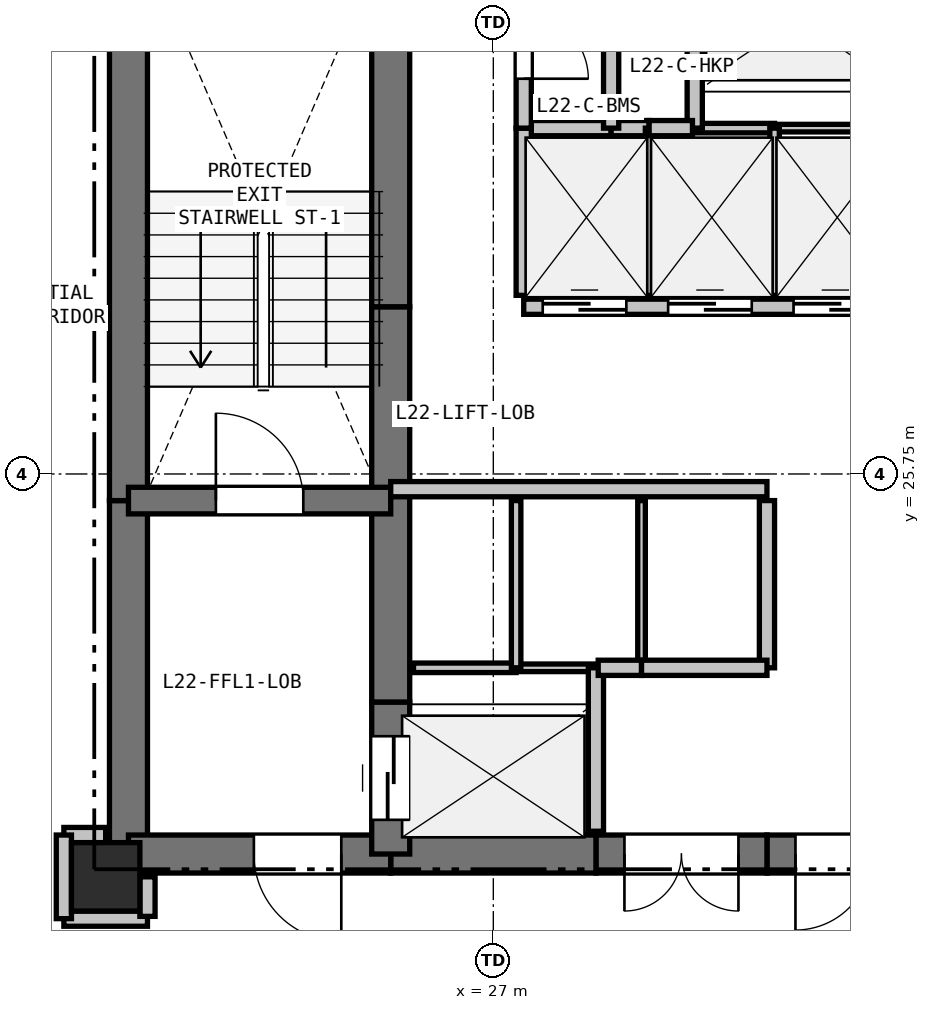
"""IFC4 building model, lengths in metres.
Left out: names, types, materials, properties, quantities, classifications, styles, units other than length and angle.
Written with IfcOpenShell. Run it as: python <this file> out.ifc"""

import sys

from ifc_helpers import new_model, si_unit, direction, frame, frame_2d, origin, origin_2d, place, context, subcontext, project, spatial, rectangle, extrude, element, fill, save


model = new_model("IFC4")
c1 = context("Model", 3, precision=1e-05, world=origin(), true_north=direction((0.0, 1.0)))
c2 = subcontext(c1, "Body", "Model", "MODEL_VIEW")
j1 = project(units=[si_unit("LENGTHUNIT", "METRE"), si_unit("PLANEANGLEUNIT", "RADIAN")], contexts=[c1])
p1 = place(None, origin())
s1 = spatial("IfcSite", under=j1, at=p1, CompositionType="ELEMENT")
p2 = place(p1, origin())
s2 = spatial("IfcBuilding", under=s1, at=p2, CompositionType="ELEMENT")
p3 = place(p2, frame((0.0, 0.0, 83.4)))
s3 = spatial("IfcBuildingStorey", under=s2, at=p3, CompositionType="ELEMENT", Elevation=83.4)
p4 = place(p3, frame((21.9, 20.45, 0.0), z_axis=(0.0, 0.0, 1.0), x_axis=(1.0, 0.0, 0.0)))
e1 = element("IfcColumn", 1, at=p4, inside=s3, PredefinedType="COLUMN", context=c2, shape_type="SweptSolid", body=[
    extrude(rectangle(XDim=0.9, YDim=0.9, at=origin_2d()), origin(), (0.0, 0.0, 1.0), 3.3),
])
p5 = place(p3, frame((22.2, 20.75, 0.0), z_axis=(0.0, 0.0, 1.0), x_axis=(0.0, 1.0, 0.0)))
e2 = element("IfcWall", 2, at=p5, inside=s3, PredefinedType="SHEAR", context=c2, shape_type="SweptSolid", body=[
    extrude(rectangle(XDim=4.65, YDim=0.5, at=frame_2d((2.325, 0.0))), origin(), (0.0, 0.0, 1.0), 3.05),
])
p6 = place(p3, frame((22.2, 25.4, 0.0), z_axis=(0.0, 0.0, 1.0), x_axis=(0.0, 1.0, 0.0)))
e3 = element("IfcWall", 3, at=p6, inside=s3, PredefinedType="SHEAR", context=c2, shape_type="SweptSolid", body=[
    extrude(rectangle(XDim=7.35, YDim=0.5, at=frame_2d((3.675, 0.0))), origin(), (0.0, 0.0, 1.0), 3.05),
])
p7 = place(p3, frame((32.35, 20.75, 0.0), z_axis=(0.0, 0.0, 1.0), x_axis=(-1.0, 0.0, 0.0)))
e4 = element("IfcWall", 4, at=p7, inside=s3, PredefinedType="SHEAR", context=c2, shape_type="SweptSolid", body=[
    extrude(rectangle(XDim=1.75, YDim=0.5, at=frame_2d((0.875, 0.0))), origin(), (0.0, 0.0, 1.0), 3.05),
])
p8 = place(p7, frame((0.375, 0.0, 0.0)))
e5 = element("IfcOpeningElement", 5, at=p8, cuts=e4, PredefinedType="OPENING", context=c2, shape_type="SweptSolid", body=[
    extrude(rectangle(XDim=1.0, YDim=2.15, at=frame_2d((0.5, 1.075))), frame((0.0, 0.26, 0.0), z_axis=(0.0, -1.0, 0.0), x_axis=(1.0, 0.0, 0.0)), (0.0, 0.0, 1.0), 0.52),
])
p9 = place(p3, frame((30.6, 20.75, 0.0), z_axis=(0.0, 0.0, 1.0), x_axis=(-1.0, 0.0, 0.0)))
e6 = element("IfcWall", 6, at=p9, inside=s3, PredefinedType="SHEAR", context=c2, shape_type="SweptSolid", body=[
    extrude(rectangle(XDim=2.25, YDim=0.5, at=frame_2d((1.125, 0.0))), origin(), (0.0, 0.0, 1.0), 3.05),
])
p10 = place(p9, frame((0.375, 0.0, 0.0)))
e7 = element("IfcOpeningElement", 7, at=p10, cuts=e6, PredefinedType="OPENING", context=c2, shape_type="SweptSolid", body=[
    extrude(rectangle(XDim=1.5, YDim=2.2, at=frame_2d((0.75, 1.1))), frame((0.0, 0.26, 0.0), z_axis=(0.0, -1.0, 0.0), x_axis=(1.0, 0.0, 0.0)), (0.0, 0.0, 1.0), 0.52),
])
p11 = place(p3, frame((28.35, 20.75, 0.0), z_axis=(0.0, 0.0, 1.0), x_axis=(-1.0, 0.0, 0.0)))
e8 = element("IfcWall", 8, at=p11, inside=s3, PredefinedType="SHEAR", context=c2, shape_type="SweptSolid", body=[
    extrude(rectangle(XDim=2.7, YDim=0.5, at=frame_2d((1.35, 0.0))), origin(), (0.0, 0.0, 1.0), 3.05),
])
p12 = place(p3, frame((25.65, 20.75, 0.0), z_axis=(0.0, 0.0, 1.0), x_axis=(-1.0, 0.0, 0.0)))
e9 = element("IfcWall", 9, at=p12, inside=s3, PredefinedType="SHEAR", context=c2, shape_type="SweptSolid", body=[
    extrude(rectangle(XDim=3.45, YDim=0.5, at=frame_2d((1.725, 0.0))), origin(), (0.0, 0.0, 1.0), 3.05),
])
p13 = place(p12, frame((0.65, 0.0, 0.0)))
e10 = element("IfcOpeningElement", 10, at=p13, cuts=e9, PredefinedType="OPENING", context=c2, shape_type="SweptSolid", body=[
    extrude(rectangle(XDim=1.15, YDim=2.15, at=frame_2d((0.575, 1.075))), frame((0.0, 0.26, 0.0), z_axis=(0.0, -1.0, 0.0), x_axis=(1.0, 0.0, 0.0)), (0.0, 0.0, 1.0), 0.52),
])
p14 = place(p3, frame((25.65, 20.75, 0.0), z_axis=(0.0, 0.0, 1.0), x_axis=(0.0, 1.0, 0.0)))
e11 = element("IfcWall", 11, at=p14, inside=s3, PredefinedType="SHEAR", context=c2, shape_type="SweptSolid", body=[
    extrude(rectangle(XDim=2.0, YDim=0.5, at=frame_2d((1.0, 0.0))), origin(), (0.0, 0.0, 1.0), 3.05),
])
p15 = place(p14, frame((0.45, 0.0, 0.0)))
e12 = element("IfcOpeningElement", 12, at=p15, cuts=e11, PredefinedType="OPENING", context=c2, shape_type="SweptSolid", body=[
    extrude(rectangle(XDim=1.1, YDim=2.15, at=frame_2d((0.55, 1.075))), frame((0.0, 0.26, 0.0), z_axis=(0.0, -1.0, 0.0), x_axis=(1.0, 0.0, 0.0)), (0.0, 0.0, 1.0), 0.52),
])
p16 = place(p3, frame((25.65, 22.75, 0.0), z_axis=(0.0, 0.0, 1.0), x_axis=(0.0, 1.0, 0.0)))
e13 = element("IfcWall", 13, at=p16, inside=s3, PredefinedType="SHEAR", context=c2, shape_type="SweptSolid", body=[
    extrude(rectangle(XDim=2.8, YDim=0.5, at=frame_2d((1.4, 0.0))), origin(), (0.0, 0.0, 1.0), 3.05),
])
p17 = place(p3, frame((25.65, 25.55, 0.0), z_axis=(0.0, 0.0, 1.0), x_axis=(0.0, 1.0, 0.0)))
e14 = element("IfcWall", 14, at=p17, inside=s3, PredefinedType="SHEAR", context=c2, shape_type="SweptSolid", body=[
    extrude(rectangle(XDim=2.4, YDim=0.5, at=frame_2d((1.2, 0.0))), origin(), (0.0, 0.0, 1.0), 3.05),
])
p18 = place(p3, frame((25.65, 27.95, 0.0), z_axis=(0.0, 0.0, 1.0), x_axis=(0.0, 1.0, 0.0)))
e15 = element("IfcWall", 15, at=p18, inside=s3, PredefinedType="SHEAR", context=c2, shape_type="SweptSolid", body=[
    extrude(rectangle(XDim=4.8, YDim=0.5, at=frame_2d((2.4, 0.0))), origin(), (0.0, 0.0, 1.0), 3.05),
])
p19 = place(p3, frame((22.2, 25.4, 0.0), z_axis=(0.0, 0.0, 1.0), x_axis=(1.0, 0.0, 0.0)))
e16 = element("IfcWall", 16, at=p19, inside=s3, PredefinedType="SHEAR", context=c2, shape_type="SweptSolid", body=[
    extrude(rectangle(XDim=3.45, YDim=0.35, at=frame_2d((1.725, 0.0))), origin(), (0.0, 0.0, 1.0), 3.05),
])
p20 = place(p19, frame((1.15, 0.0, 0.0)))
e17 = element("IfcOpeningElement", 17, at=p20, cuts=e16, PredefinedType="OPENING", context=c2, shape_type="SweptSolid", body=[
    extrude(rectangle(XDim=1.15, YDim=2.15, at=frame_2d((0.575, 1.075))), frame((0.0, 0.185, 0.0), z_axis=(0.0, -1.0, 0.0), x_axis=(1.0, 0.0, 0.0)), (0.0, 0.0, 1.0), 0.37),
])
p21 = place(p3, frame((25.65, 25.55, 0.0), z_axis=(0.0, 0.0, 1.0), x_axis=(1.0, 0.0, 0.0)))
e18 = element("IfcWall", 18, at=p21, inside=s3, PredefinedType="PARTITIONING", context=c2, shape_type="SweptSolid", body=[
    extrude(rectangle(XDim=4.95, YDim=0.2, at=frame_2d((2.475, 0.0))), origin(), (0.0, 0.0, 1.0), 3.05),
])
p22 = place(p3, frame((27.4, 27.95, 0.0), z_axis=(0.0, 0.0, 1.0), x_axis=(1.0, 0.0, 0.0)))
e19 = element("IfcWall", 19, at=p22, inside=s3, PredefinedType="PARTITIONING", context=c2, shape_type="SweptSolid", body=[
    extrude(rectangle(XDim=4.95, YDim=0.2, at=frame_2d((2.475, 0.0))), origin(), (0.0, 0.0, 1.0), 3.05),
])
p23 = place(p22, frame((0.25, 0.0, 0.0)))
e20 = element("IfcOpeningElement", 20, at=p23, cuts=e19, PredefinedType="OPENING", context=c2, shape_type="SweptSolid", body=[
    extrude(rectangle(XDim=1.1, YDim=2.15, at=frame_2d((0.55, 1.075))), frame((0.0, 0.11, 0.0), z_axis=(0.0, -1.0, 0.0), x_axis=(1.0, 0.0, 0.0)), (0.0, 0.0, 1.0), 0.22),
])
p24 = place(p22, frame((1.9, 0.0, 0.0)))
e21 = element("IfcOpeningElement", 21, at=p24, cuts=e19, PredefinedType="OPENING", context=c2, shape_type="SweptSolid", body=[
    extrude(rectangle(XDim=1.1, YDim=2.15, at=frame_2d((0.55, 1.075))), frame((0.0, 0.11, 0.0), z_axis=(0.0, -1.0, 0.0), x_axis=(1.0, 0.0, 0.0)), (0.0, 0.0, 1.0), 0.22),
])
p25 = place(p22, frame((3.55, 0.0, 0.0)))
e22 = element("IfcOpeningElement", 22, at=p25, cuts=e19, PredefinedType="OPENING", context=c2, shape_type="SweptSolid", body=[
    extrude(rectangle(XDim=1.1, YDim=2.15, at=frame_2d((0.55, 1.075))), frame((0.0, 0.11, 0.0), z_axis=(0.0, -1.0, 0.0), x_axis=(1.0, 0.0, 0.0)), (0.0, 0.0, 1.0), 0.22),
])
p26 = place(p3, frame((25.95, 23.2, 0.0), z_axis=(0.0, 0.0, 1.0), x_axis=(1.0, 0.0, 0.0)))
e23 = element("IfcWall", 23, at=p26, inside=s3, PredefinedType="PARTITIONING", context=c2, shape_type="SweptSolid", body=[
    extrude(rectangle(XDim=1.35, YDim=0.125, at=frame_2d((0.675, 0.0))), origin(), (0.0, 0.0, 1.0), 3.05),
])
p27 = place(p3, frame((27.3, 23.2, 0.0), z_axis=(0.0, 0.0, 1.0), x_axis=(1.0, 0.0, 0.0)))
e24 = element("IfcWall", 24, at=p27, inside=s3, PredefinedType="PARTITIONING", context=c2, shape_type="SweptSolid", body=[
    extrude(rectangle(XDim=1.05, YDim=0.1, at=frame_2d((0.525, 0.0))), origin(), (0.0, 0.0, 1.0), 3.05),
])
p28 = place(p3, frame((28.35, 23.2, 0.0), z_axis=(0.0, 0.0, 1.0), x_axis=(0.0, -1.0, 0.0)))
e25 = element("IfcWall", 25, at=p28, inside=s3, PredefinedType="PARTITIONING", context=c2, shape_type="SweptSolid", body=[
    extrude(rectangle(XDim=2.15, YDim=0.2, at=frame_2d((1.075, 0.0))), origin(), (0.0, 0.0, 1.0), 3.05),
])
p29 = place(p3, frame((32.05, 30.3, 0.0), z_axis=(0.0, 0.0, 1.0), x_axis=(-1.0, 0.0, 0.0)))
e26 = element("IfcWall", 26, at=p29, inside=s3, PredefinedType="PARTITIONING", context=c2, shape_type="SweptSolid", body=[
    extrude(rectangle(XDim=1.35, YDim=0.1, at=frame_2d((0.675, 0.0))), origin(), (0.0, 0.0, 1.0), 3.05),
])
p30 = place(p3, frame((30.7, 30.3, 0.0), z_axis=(0.0, 0.0, 1.0), x_axis=(-1.0, 0.0, 0.0)))
e27 = element("IfcWall", 27, at=p30, inside=s3, PredefinedType="PARTITIONING", context=c2, shape_type="SweptSolid", body=[
    extrude(rectangle(XDim=1.05, YDim=0.125, at=frame_2d((0.525, 0.0))), origin(), (0.0, 0.0, 1.0), 3.05),
])
p31 = place(p3, frame((29.65, 30.3, 0.0), z_axis=(0.0, 0.0, 1.0), x_axis=(0.0, 1.0, 0.0)))
e28 = element("IfcWall", 28, at=p31, inside=s3, PredefinedType="PARTITIONING", context=c2, shape_type="SweptSolid", body=[
    extrude(rectangle(XDim=2.15, YDim=0.2, at=frame_2d((1.075, 0.0))), origin(), (0.0, 0.0, 1.0), 3.05),
])
p32 = place(p3, frame((27.3, 25.4, 0.0), z_axis=(0.0, 0.0, 1.0), x_axis=(0.0, -1.0, 0.0)))
e29 = element("IfcWall", 29, at=p32, inside=s3, PredefinedType="PARTITIONING", context=c2, shape_type="SweptSolid", body=[
    extrude(rectangle(XDim=2.2, YDim=0.125, at=frame_2d((1.1, 0.0))), origin(), (0.0, 0.0, 1.0), 3.05),
])
p33 = place(p3, frame((28.95, 25.4, 0.0), z_axis=(0.0, 0.0, 1.0), x_axis=(0.0, -1.0, 0.0)))
e30 = element("IfcWall", 30, at=p33, inside=s3, PredefinedType="PARTITIONING", context=c2, shape_type="SweptSolid", body=[
    extrude(rectangle(XDim=2.2, YDim=0.1, at=frame_2d((1.1, 0.0))), origin(), (0.0, 0.0, 1.0), 3.05),
])
p34 = place(p3, frame((28.95, 23.2, 0.0), z_axis=(0.0, 0.0, 1.0), x_axis=(-1.0, 0.0, 0.0)))
e31 = element("IfcWall", 31, at=p34, inside=s3, PredefinedType="PARTITIONING", context=c2, shape_type="SweptSolid", body=[
    extrude(rectangle(XDim=0.57, YDim=0.2, at=frame_2d((0.285, 0.0))), origin(), (0.0, 0.0, 1.0), 3.05),
])
p35 = place(p3, frame((30.6, 25.4, 0.0), z_axis=(0.0, 0.0, 1.0), x_axis=(0.0, -1.0, 0.0)))
e32 = element("IfcWall", 32, at=p35, inside=s3, PredefinedType="PARTITIONING", context=c2, shape_type="SweptSolid", body=[
    extrude(rectangle(XDim=2.2, YDim=0.2, at=frame_2d((1.1, 0.0))), origin(), (0.0, 0.0, 1.0), 3.05),
])
p36 = place(p3, frame((30.6, 23.2, 0.0), z_axis=(0.0, 0.0, 1.0), x_axis=(-1.0, 0.0, 0.0)))
e33 = element("IfcWall", 33, at=p36, inside=s3, PredefinedType="PARTITIONING", context=c2, shape_type="SweptSolid", body=[
    extrude(rectangle(XDim=1.65, YDim=0.2, at=frame_2d((0.825, 0.0))), origin(), (0.0, 0.0, 1.0), 3.05),
])
p37 = place(p3, frame((27.4, 30.3, 0.0), z_axis=(0.0, 0.0, 1.0), x_axis=(1.0, 0.0, 0.0)))
e34 = element("IfcWall", 34, at=p37, inside=s3, PredefinedType="PARTITIONING", context=c2, shape_type="SweptSolid", body=[
    extrude(rectangle(XDim=1.15, YDim=0.2, at=frame_2d((0.575, 0.0))), origin(), (0.0, 0.0, 1.0), 3.05),
])
p38 = place(p3, frame((28.55, 30.3, 0.0), z_axis=(0.0, 0.0, 1.0), x_axis=(1.0, 0.0, 0.0)))
e35 = element("IfcWall", 35, at=p38, inside=s3, PredefinedType="PARTITIONING", context=c2, shape_type="SweptSolid", body=[
    extrude(rectangle(XDim=0.5, YDim=0.2, at=frame_2d((0.25, 0.0))), origin(), (0.0, 0.0, 1.0), 3.05),
])
p39 = place(p3, frame((29.05, 30.3, 0.0), z_axis=(0.0, 0.0, 1.0), x_axis=(0.0, -1.0, 0.0)))
e36 = element("IfcWall", 36, at=p39, inside=s3, PredefinedType="PARTITIONING", context=c2, shape_type="SweptSolid", body=[
    extrude(rectangle(XDim=2.2, YDim=0.1, at=frame_2d((1.1, 0.0))), origin(), (0.0, 0.0, 1.0), 3.05),
])
p40 = place(p3, frame((27.4, 28.1, 0.0), z_axis=(0.0, 0.0, 1.0), x_axis=(0.0, 1.0, 0.0)))
e37 = element("IfcWall", 37, at=p40, inside=s3, PredefinedType="PARTITIONING", context=c2, shape_type="SweptSolid", body=[
    extrude(rectangle(XDim=2.2, YDim=0.2, at=frame_2d((1.1, 0.0))), origin(), (0.0, 0.0, 1.0), 3.05),
])
p41 = place(p3, frame((29.05, 30.3, 0.0), z_axis=(0.0, 0.0, 1.0), x_axis=(1.0, 0.0, 0.0)))
e38 = element("IfcWall", 38, at=p41, inside=s3, PredefinedType="PARTITIONING", context=c2, shape_type="SweptSolid", body=[
    extrude(rectangle(XDim=0.57, YDim=0.2, at=frame_2d((0.285, 0.0))), origin(), (0.0, 0.0, 1.0), 3.05),
])
p42 = place(p3, frame((30.7, 30.3, 0.0), z_axis=(0.0, 0.0, 1.0), x_axis=(0.0, -1.0, 0.0)))
e39 = element("IfcWall", 39, at=p42, inside=s3, PredefinedType="PARTITIONING", context=c2, shape_type="SweptSolid", body=[
    extrude(rectangle(XDim=2.2, YDim=0.125, at=frame_2d((1.1, 0.0))), origin(), (0.0, 0.0, 1.0), 3.05),
])
p43 = place(p3, frame((27.4, 32.45, 0.0), z_axis=(0.0, 0.0, 1.0), x_axis=(0.0, -1.0, 0.0)))
e40 = element("IfcWall", 40, at=p43, inside=s3, PredefinedType="PARTITIONING", context=c2, shape_type="SweptSolid", body=[
    extrude(rectangle(XDim=2.15, YDim=0.2, at=frame_2d((1.075, 0.0))), origin(), (0.0, 0.0, 1.0), 3.05),
])
p44 = place(p43, frame((0.65, 0.0, 0.0)))
e41 = element("IfcOpeningElement", 41, at=p44, cuts=e40, PredefinedType="OPENING", context=c2, shape_type="SweptSolid", body=[
    extrude(rectangle(XDim=0.85, YDim=2.1, at=frame_2d((0.425, 1.05))), frame((0.0, 0.11, 0.0), z_axis=(0.0, -1.0, 0.0), x_axis=(1.0, 0.0, 0.0)), (0.0, 0.0, 1.0), 0.22),
])
p45 = place(p3, frame((21.35, 19.9, 0.0), z_axis=(0.0, 0.0, 1.0), x_axis=(1.0, 0.0, 0.0)))
e42 = element("IfcWall", 42, at=p45, inside=s3, PredefinedType="PARTITIONING", context=c2, shape_type="SweptSolid", body=[
    extrude(rectangle(XDim=1.1, YDim=0.2, at=frame_2d((0.55, 0.0))), origin(), (0.0, 0.0, 1.0), 2.423),
])
p46 = place(p3, frame((22.45, 19.93, 0.0), z_axis=(0.0, 0.0, 1.0), x_axis=(0.0, 1.0, 0.0)))
e43 = element("IfcWall", 43, at=p46, inside=s3, PredefinedType="PARTITIONING", context=c2, shape_type="SweptSolid", body=[
    extrude(rectangle(XDim=0.52, YDim=0.2, at=frame_2d((0.26, 0.0))), origin(), (0.0, 0.0, 1.0), 2.423),
])
p47 = place(p3, frame((21.9, 21.0, 0.0), z_axis=(0.0, 0.0, 1.0), x_axis=(-1.0, 0.0, 0.0)))
e44 = element("IfcWall", 44, at=p47, inside=s3, PredefinedType="PARTITIONING", context=c2, shape_type="SweptSolid", body=[
    extrude(rectangle(XDim=0.55, YDim=0.2, at=frame_2d((0.275, 0.0))), origin(), (0.0, 0.0, 1.0), 2.498),
])
p48 = place(p3, frame((21.35, 21.0, 0.0), z_axis=(0.0, 0.0, 1.0), x_axis=(0.0, -1.0, 0.0)))
e45 = element("IfcWall", 45, at=p48, inside=s3, PredefinedType="PARTITIONING", context=c2, shape_type="SweptSolid", body=[
    extrude(rectangle(XDim=1.1, YDim=0.2, at=frame_2d((0.55, 0.0))), origin(), (0.0, 0.0, 1.0), 2.423),
])
p49 = place(p3, frame((28.55, 32.45, 0.0), z_axis=(0.0, 0.0, 1.0), x_axis=(0.0, -1.0, 0.0)))
e46 = element("IfcWall", 46, at=p49, inside=s3, PredefinedType="PARTITIONING", context=c2, shape_type="SweptSolid", body=[
    extrude(rectangle(XDim=2.15, YDim=0.2, at=frame_2d((1.075, 0.0))), origin(), (0.0, 0.0, 1.0), 3.05),
])
p50 = place(p23, origin())
e47 = element("IfcDoor", 47, at=p50, inside=s3, OperationType="SLIDING_TO_LEFT", PredefinedType="DOOR", context=c2, shape_type="SweptSolid", body=[
    extrude(rectangle(XDim=1.1, YDim=2.15, at=frame_2d((0.55, 1.075))), frame((0.0, 0.025, 0.0), z_axis=(0.0, -1.0, 0.0), x_axis=(1.0, 0.0, 0.0)), (0.0, 0.0, 1.0), 0.05),
])
fill(e20, e47)
p51 = place(p24, origin())
e48 = element("IfcDoor", 48, at=p51, inside=s3, OperationType="SLIDING_TO_LEFT", PredefinedType="DOOR", context=c2, shape_type="SweptSolid", body=[
    extrude(rectangle(XDim=1.1, YDim=2.15, at=frame_2d((0.55, 1.075))), frame((0.0, 0.025, 0.0), z_axis=(0.0, -1.0, 0.0), x_axis=(1.0, 0.0, 0.0)), (0.0, 0.0, 1.0), 0.05),
])
fill(e21, e48)
p52 = place(p25, origin())
e49 = element("IfcDoor", 49, at=p52, inside=s3, OperationType="SLIDING_TO_LEFT", PredefinedType="DOOR", context=c2, shape_type="SweptSolid", body=[
    extrude(rectangle(XDim=1.1, YDim=2.15, at=frame_2d((0.55, 1.075))), frame((0.0, 0.025, 0.0), z_axis=(0.0, -1.0, 0.0), x_axis=(1.0, 0.0, 0.0)), (0.0, 0.0, 1.0), 0.05),
])
fill(e22, e49)
p53 = place(p8, origin())
e50 = element("IfcDoor", 50, at=p53, inside=s3, OperationType="SINGLE_SWING_RIGHT", PredefinedType="DOOR", context=c2, shape_type="SweptSolid", body=[
    extrude(rectangle(XDim=1.0, YDim=2.15, at=frame_2d((0.5, 1.075))), frame((0.0, 0.025, 0.0), z_axis=(0.0, -1.0, 0.0), x_axis=(1.0, 0.0, 0.0)), (0.0, 0.0, 1.0), 0.05),
])
fill(e5, e50)
p54 = place(p15, origin())
e51 = element("IfcDoor", 51, at=p54, inside=s3, OperationType="SLIDING_TO_LEFT", PredefinedType="DOOR", context=c2, shape_type="SweptSolid", body=[
    extrude(rectangle(XDim=1.1, YDim=2.15, at=frame_2d((0.55, 1.075))), frame((0.0, 0.025, 0.0), z_axis=(0.0, -1.0, 0.0), x_axis=(1.0, 0.0, 0.0)), (0.0, 0.0, 1.0), 0.05),
])
fill(e12, e51)
p55 = place(p20, origin())
e52 = element("IfcDoor", 52, at=p55, inside=s3, OperationType="SINGLE_SWING_LEFT", PredefinedType="DOOR", context=c2, shape_type="SweptSolid", body=[
    extrude(rectangle(XDim=1.15, YDim=2.15, at=frame_2d((0.575, 1.075))), frame((0.0, 0.025, 0.0), z_axis=(0.0, -1.0, 0.0), x_axis=(1.0, 0.0, 0.0)), (0.0, 0.0, 1.0), 0.05),
])
fill(e17, e52)
p56 = place(p13, origin())
e53 = element("IfcDoor", 53, at=p56, inside=s3, OperationType="SINGLE_SWING_LEFT", PredefinedType="DOOR", context=c2, shape_type="SweptSolid", body=[
    extrude(rectangle(XDim=1.15, YDim=2.15, at=frame_2d((0.575, 1.075))), frame((0.0, 0.025, 0.0), z_axis=(0.0, -1.0, 0.0), x_axis=(1.0, 0.0, 0.0)), (0.0, 0.0, 1.0), 0.05),
])
fill(e10, e53)
p57 = place(p10, origin())
e54 = element("IfcDoor", 54, at=p57, inside=s3, OperationType="DOUBLE_DOOR_SINGLE_SWING", PredefinedType="DOOR", context=c2, shape_type="SweptSolid", body=[
    extrude(rectangle(XDim=1.5, YDim=2.2, at=frame_2d((0.75, 1.1))), frame((0.0, 0.025, 0.0), z_axis=(0.0, -1.0, 0.0), x_axis=(1.0, 0.0, 0.0)), (0.0, 0.0, 1.0), 0.05),
])
fill(e7, e54)
p58 = place(p44, origin())
e55 = element("IfcDoor", 55, at=p58, inside=s3, OperationType="SINGLE_SWING_RIGHT", PredefinedType="DOOR", context=c2, shape_type="SweptSolid", body=[
    extrude(rectangle(XDim=0.85, YDim=2.1, at=frame_2d((0.425, 1.05))), frame((0.0, 0.025, 0.0), z_axis=(0.0, -1.0, 0.0), x_axis=(1.0, 0.0, 0.0)), (0.0, 0.0, 1.0), 0.05),
])
fill(e41, e55)
save(model, sys.argv[1])
